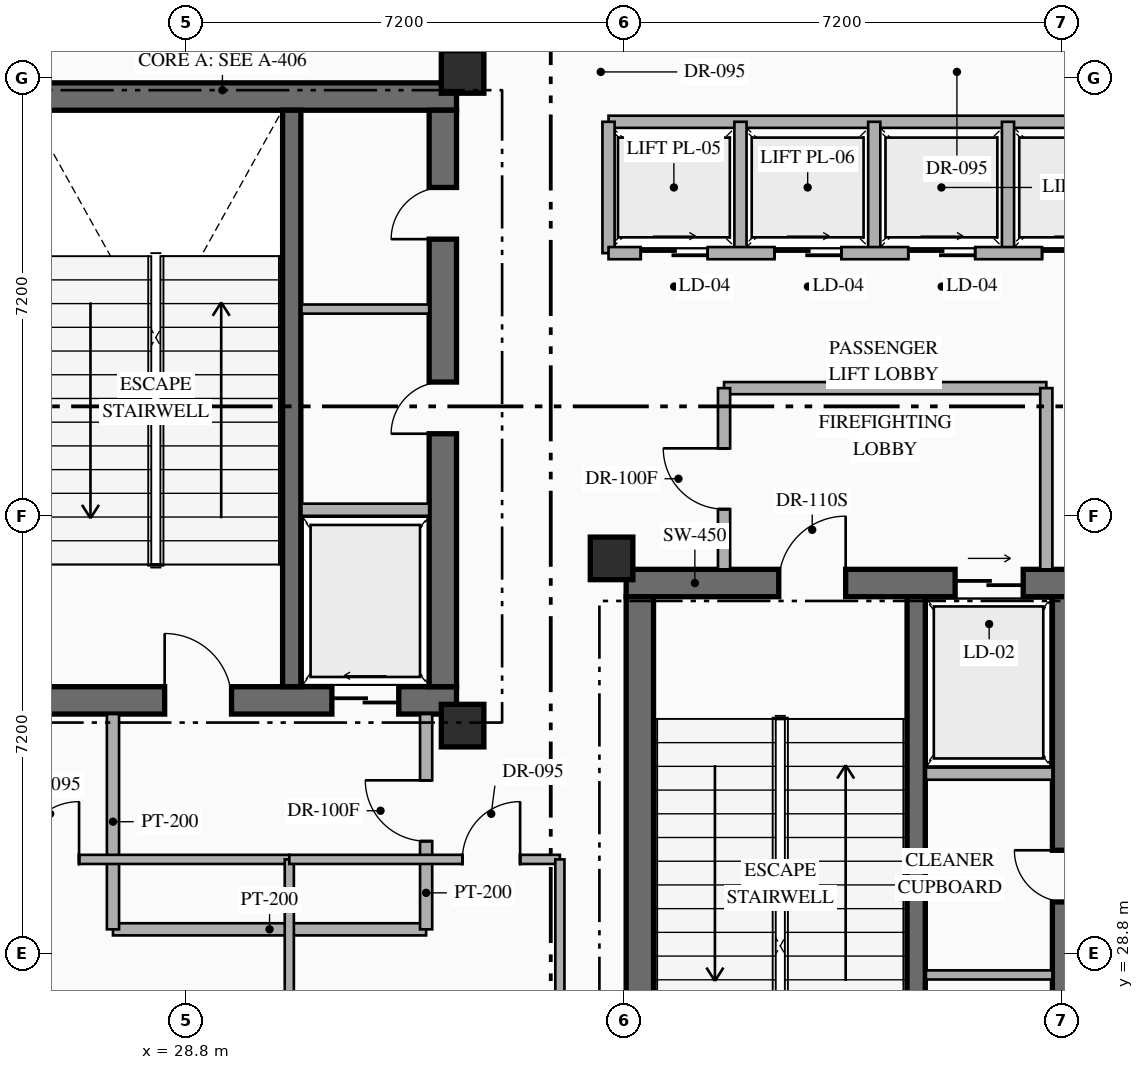
"""IFC4 building model, lengths in metres.
Left out: names, types, materials, properties, quantities, classifications, styles, units other than length and angle.
Written with IfcOpenShell. Run it as: python <this file> out.ifc"""

import sys

from ifc_helpers import new_model, si_unit, direction, frame, frame_2d, origin, origin_2d, place, context, subcontext, project, spatial, rectangle, hollow_rectangle, extrude, element, fill, save


model = new_model("IFC4")
c1 = context("Model", 3, precision=1e-05, world=origin(), true_north=direction((0.0, 1.0)))
c2 = subcontext(c1, "Body", "Model", "MODEL_VIEW")
j1 = project(units=[si_unit("LENGTHUNIT", "METRE"), si_unit("PLANEANGLEUNIT", "RADIAN")], contexts=[c1])
p1 = place(None, origin())
s1 = spatial("IfcSite", under=j1, at=p1, CompositionType="ELEMENT")
p2 = place(p1, origin())
s2 = spatial("IfcBuilding", under=s1, at=p2, CompositionType="ELEMENT")
p3 = place(p2, frame((0.0, 0.0, 234.75)))
s3 = spatial("IfcBuildingStorey", under=s2, at=p3, CompositionType="ELEMENT", Elevation=234.75)
p4 = place(p3, frame((25.77, 32.965, 0.0), z_axis=(0.0, 0.0, 1.0), x_axis=(1.0, 0.0, 0.0)))
e1 = element("IfcWall", 1, at=p4, inside=s3, PredefinedType="SHEAR", context=c2, shape_type="SweptSolid", body=[
    extrude(rectangle(XDim=7.48, YDim=0.45, at=frame_2d((3.74, 0.0))), origin(), (0.0, 0.0, 1.0), 4.8),
])
p5 = place(p4, frame((2.68, 0.0, 0.0)))
e2 = element("IfcOpeningElement", 2, at=p5, cuts=e1, PredefinedType="OPENING", context=c2, shape_type="SweptSolid", body=[
    extrude(rectangle(XDim=1.1, YDim=2.2, at=frame_2d((0.55, 1.1))), frame((0.0, 0.235, 0.0), z_axis=(0.0, -1.0, 0.0), x_axis=(1.0, 0.0, 0.0)), (0.0, 0.0, 1.0), 0.47),
])
p6 = place(p4, frame((5.43, 0.0, 0.0)))
e3 = element("IfcOpeningElement", 3, at=p6, cuts=e1, PredefinedType="OPENING", context=c2, shape_type="SweptSolid", body=[
    extrude(rectangle(XDim=1.1, YDim=2.15, at=frame_2d((0.55, 1.075))), frame((0.0, 0.235, 0.0), z_axis=(0.0, -1.0, 0.0), x_axis=(1.0, 0.0, 0.0)), (0.0, 0.0, 1.0), 0.47),
])
p7 = place(p3, frame((25.77, 42.895, 0.0), z_axis=(0.0, 0.0, 1.0), x_axis=(1.0, 0.0, 0.0)))
e4 = element("IfcWall", 4, at=p7, inside=s3, PredefinedType="SHEAR", context=c2, shape_type="SweptSolid", body=[
    extrude(rectangle(XDim=7.48, YDim=0.45, at=frame_2d((3.74, 0.0))), origin(), (0.0, 0.0, 1.0), 4.8),
])
p8 = place(p3, frame((33.025, 33.19, 0.0), z_axis=(0.0, 0.0, 1.0), x_axis=(0.0, 1.0, 0.0)))
e5 = element("IfcWall", 5, at=p8, inside=s3, PredefinedType="SHEAR", context=c2, shape_type="SweptSolid", body=[
    extrude(rectangle(XDim=9.48, YDim=0.45, at=frame_2d((4.74, 0.0))), origin(), (0.0, 0.0, 1.0), 4.8),
])
p9 = place(p8, frame((4.16, 0.0, 0.0)))
e6 = element("IfcOpeningElement", 6, at=p9, cuts=e5, PredefinedType="OPENING", context=c2, shape_type="SweptSolid", body=[
    extrude(rectangle(XDim=0.85, YDim=2.08, at=frame_2d((0.425, 1.04))), frame((0.0, 0.235, 0.0), z_axis=(0.0, -1.0, 0.0), x_axis=(1.0, 0.0, 0.0)), (0.0, 0.0, 1.0), 0.47),
])
p10 = place(p8, frame((7.36, 0.0, 0.0)))
e7 = element("IfcOpeningElement", 7, at=p10, cuts=e5, PredefinedType="OPENING", context=c2, shape_type="SweptSolid", body=[
    extrude(rectangle(XDim=0.85, YDim=2.08, at=frame_2d((0.425, 1.04))), frame((0.0, 0.235, 0.0), z_axis=(0.0, -1.0, 0.0), x_axis=(1.0, 0.0, 0.0)), (0.0, 0.0, 1.0), 0.47),
])
p11 = place(p3, frame((30.54, 33.19, 0.0), z_axis=(0.0, 0.0, 1.0), x_axis=(0.0, 1.0, 0.0)))
e8 = element("IfcWall", 8, at=p11, inside=s3, PredefinedType="SHEAR", context=c2, shape_type="SweptSolid", body=[
    extrude(rectangle(XDim=9.48, YDim=0.3, at=frame_2d((4.74, 0.0))), origin(), (0.0, 0.0, 1.0), 4.8),
])
p12 = place(p3, frame((36.04, 34.895, 0.0), z_axis=(0.0, 0.0, 1.0), x_axis=(1.0, 0.0, 0.0)))
e9 = element("IfcWall", 9, at=p12, inside=s3, PredefinedType="SHEAR", context=c2, shape_type="SweptSolid", body=[
    extrude(rectangle(XDim=7.46, YDim=0.45, at=frame_2d((3.73, 0.0))), origin(), (0.0, 0.0, 1.0), 4.8),
])
p13 = place(p12, frame((2.51, 0.0, 0.0)))
e10 = element("IfcOpeningElement", 10, at=p13, cuts=e9, PredefinedType="OPENING", context=c2, shape_type="SweptSolid", body=[
    extrude(rectangle(XDim=1.1, YDim=2.2, at=frame_2d((0.55, 1.1))), frame((0.0, 0.235, 0.0), z_axis=(0.0, -1.0, 0.0), x_axis=(1.0, 0.0, 0.0)), (0.0, 0.0, 1.0), 0.47),
])
p14 = place(p12, frame((5.41, 0.0, 0.0)))
e11 = element("IfcOpeningElement", 11, at=p14, cuts=e9, PredefinedType="OPENING", context=c2, shape_type="SweptSolid", body=[
    extrude(rectangle(XDim=1.12, YDim=2.15, at=frame_2d((0.56, 1.075))), frame((0.0, 0.235, 0.0), z_axis=(0.0, -1.0, 0.0), x_axis=(1.0, 0.0, 0.0)), (0.0, 0.0, 1.0), 0.47),
])
p15 = place(p3, frame((36.265, 25.19, 0.0), z_axis=(0.0, 0.0, 1.0), x_axis=(0.0, 1.0, 0.0)))
e12 = element("IfcWall", 12, at=p15, inside=s3, PredefinedType="SHEAR", context=c2, shape_type="SweptSolid", body=[
    extrude(rectangle(XDim=9.48, YDim=0.45, at=frame_2d((4.74, 0.0))), origin(), (0.0, 0.0, 1.0), 4.8),
])
p16 = place(p3, frame((43.275, 25.19, 0.0), z_axis=(0.0, 0.0, 1.0), x_axis=(0.0, 1.0, 0.0)))
e13 = element("IfcWall", 13, at=p16, inside=s3, PredefinedType="SHEAR", context=c2, shape_type="SweptSolid", body=[
    extrude(rectangle(XDim=9.48, YDim=0.45, at=frame_2d((4.74, 0.0))), origin(), (0.0, 0.0, 1.0), 4.8),
])
p17 = place(p16, frame((1.21, 0.0, 0.0)))
e14 = element("IfcOpeningElement", 14, at=p17, cuts=e13, PredefinedType="OPENING", context=c2, shape_type="SweptSolid", body=[
    extrude(rectangle(XDim=0.85, YDim=2.08, at=frame_2d((0.425, 1.04))), frame((0.0, 0.235, 0.0), z_axis=(0.0, -1.0, 0.0), x_axis=(1.0, 0.0, 0.0)), (0.0, 0.0, 1.0), 0.47),
])
p18 = place(p16, frame((4.46, 0.0, 0.0)))
e15 = element("IfcOpeningElement", 15, at=p18, cuts=e13, PredefinedType="OPENING", context=c2, shape_type="SweptSolid", body=[
    extrude(rectangle(XDim=0.85, YDim=2.08, at=frame_2d((0.425, 1.04))), frame((0.0, 0.235, 0.0), z_axis=(0.0, -1.0, 0.0), x_axis=(1.0, 0.0, 0.0)), (0.0, 0.0, 1.0), 0.47),
])
p19 = place(p3, frame((40.81, 25.19, 0.0), z_axis=(0.0, 0.0, 1.0), x_axis=(0.0, 1.0, 0.0)))
e16 = element("IfcWall", 16, at=p19, inside=s3, PredefinedType="SHEAR", context=c2, shape_type="SweptSolid", body=[
    extrude(rectangle(XDim=9.48, YDim=0.3, at=frame_2d((4.74, 0.0))), origin(), (0.0, 0.0, 1.0), 4.8),
])
for number, where, z_axis, x_axis in (
    (17, (33.35, 32.55, 0.0), (0.0, 0.0, 1.0), (1.0, 0.0, 0.0)),
    (18, (33.35, 43.3, 0.0), (0.0, 0.0, 1.0), (1.0, 0.0, 0.0)),
    (19, (35.8, 35.3, 0.0), (0.0, 0.0, 1.0), (1.0, 0.0, 0.0)),
):
    element("IfcColumn", number, at=place(p3, frame(where, z_axis=z_axis, x_axis=x_axis)), inside=s3, PredefinedType="COLUMN", context=c2, shape_type="SweptSolid", body=[
        extrude(hollow_rectangle(XDim=0.7, YDim=0.7, WallThickness=0.028, at=origin_2d()), origin(), (0.0, 0.0, 1.0), 4.8),
    ])
p20 = place(p3, frame((53.493, 31.358, 0.0), z_axis=(0.0, 0.0, 1.0), x_axis=(-0.599970072971, -0.800022444397, 0.0)))
e20 = element("IfcWall", 20, at=p20, inside=s3, PredefinedType="STANDARD", context=c2, shape_type="SweptSolid", body=[
    extrude(rectangle(XDim=20.885, YDim=0.28, at=frame_2d((10.442, 0.0))), origin(), (0.0, 0.0, 1.0), 4.55),
])
p21 = place(p20, frame((16.181, 0.0, 0.0)))
e21 = element("IfcOpeningElement", 21, at=p21, cuts=e20, PredefinedType="OPENING", context=c2, shape_type="SweptSolid", body=[
    extrude(rectangle(XDim=1.8, YDim=2.25, at=frame_2d((0.9, 1.125))), frame((0.0, 0.15, 0.0), z_axis=(0.0, -1.0, 0.0), x_axis=(1.0, 0.0, 0.0)), (0.0, 0.0, 1.0), 0.3),
])
p22 = place(p20, frame((1.456, 0.0, 0.75)))
e22 = element("IfcOpeningElement", 22, at=p22, cuts=e20, PredefinedType="OPENING", context=c2, shape_type="SweptSolid", body=[
    extrude(rectangle(XDim=2.1, YDim=2.2, at=frame_2d((1.05, 1.1))), frame((0.0, 0.15, 0.0), z_axis=(0.0, -1.0, 0.0), x_axis=(1.0, 0.0, 0.0)), (0.0, 0.0, 1.0), 0.3),
])
p23 = place(p3, frame((30.7, 36.1, 0.0), z_axis=(0.0, 0.0, 1.0), x_axis=(1.0, 0.0, 0.0)))
e23 = element("IfcWall", 23, at=p23, inside=s3, PredefinedType="STANDARD", context=c2, shape_type="SweptSolid", body=[
    extrude(rectangle(XDim=2.1, YDim=0.2, at=frame_2d((1.05, 0.0))), origin(), (0.0, 0.0, 1.0), 4.55),
])
p24 = place(p3, frame((30.7, 39.4, 0.0), z_axis=(0.0, 0.0, 1.0), x_axis=(1.0, 0.0, 0.0)))
e24 = element("IfcWall", 24, at=p24, inside=s3, PredefinedType="PARTITIONING", context=c2, shape_type="SweptSolid", body=[
    extrude(rectangle(XDim=2.1, YDim=0.15, at=frame_2d((1.05, 0.0))), origin(), (0.0, 0.0, 1.0), 4.55),
])
p25 = place(p3, frame((40.97, 31.76, 0.0), z_axis=(0.0, 0.0, 1.0), x_axis=(1.0, 0.0, 0.0)))
e25 = element("IfcWall", 25, at=p25, inside=s3, PredefinedType="STANDARD", context=c2, shape_type="SweptSolid", body=[
    extrude(rectangle(XDim=2.08, YDim=0.2, at=frame_2d((1.04, 0.0))), origin(), (0.0, 0.0, 1.0), 4.55),
])
p26 = place(p3, frame((40.97, 28.45, 0.0), z_axis=(0.0, 0.0, 1.0), x_axis=(1.0, 0.0, 0.0)))
e26 = element("IfcWall", 26, at=p26, inside=s3, PredefinedType="PARTITIONING", context=c2, shape_type="SweptSolid", body=[
    extrude(rectangle(XDim=2.08, YDim=0.15, at=frame_2d((1.04, 0.0))), origin(), (0.0, 0.0, 1.0), 4.55),
])
p27 = place(p3, frame((27.6, 29.2, 0.0), z_axis=(0.0, 0.0, 1.0), x_axis=(1.0, 0.0, 0.0)))
e27 = element("IfcWall", 27, at=p27, inside=s3, PredefinedType="STANDARD", context=c2, shape_type="SweptSolid", body=[
    extrude(rectangle(XDim=5.15, YDim=0.2, at=frame_2d((2.575, 0.0))), origin(), (0.0, 0.0, 1.0), 4.55),
])
p28 = place(p3, frame((27.6, 29.2, 0.0), z_axis=(0.0, 0.0, 1.0), x_axis=(0.0, 1.0, 0.0)))
e28 = element("IfcWall", 28, at=p28, inside=s3, PredefinedType="STANDARD", context=c2, shape_type="SweptSolid", body=[
    extrude(rectangle(XDim=3.54, YDim=0.2, at=frame_2d((1.77, 0.0))), origin(), (0.0, 0.0, 1.0), 4.55),
])
p29 = place(p3, frame((32.75, 29.2, 0.0), z_axis=(0.0, 0.0, 1.0), x_axis=(0.0, 1.0, 0.0)))
e29 = element("IfcWall", 29, at=p29, inside=s3, PredefinedType="STANDARD", context=c2, shape_type="SweptSolid", body=[
    extrude(rectangle(XDim=3.54, YDim=0.2, at=frame_2d((1.77, 0.0))), origin(), (0.0, 0.0, 1.0), 4.55),
])
p30 = place(p29, frame((1.45, 0.0, 0.0)))
e30 = element("IfcOpeningElement", 30, at=p30, cuts=e29, PredefinedType="OPENING", context=c2, shape_type="SweptSolid", body=[
    extrude(rectangle(XDim=1.0, YDim=2.2, at=frame_2d((0.5, 1.1))), frame((0.0, 0.11, 0.0), z_axis=(0.0, -1.0, 0.0), x_axis=(1.0, 0.0, 0.0)), (0.0, 0.0, 1.0), 0.22),
])
p31 = place(p3, frame((37.65, 38.1, 0.0), z_axis=(0.0, 0.0, 1.0), x_axis=(1.0, 0.0, 0.0)))
e31 = element("IfcWall", 31, at=p31, inside=s3, PredefinedType="STANDARD", context=c2, shape_type="SweptSolid", body=[
    extrude(rectangle(XDim=5.3, YDim=0.2, at=frame_2d((2.65, 0.0))), origin(), (0.0, 0.0, 1.0), 4.55),
])
p32 = place(p3, frame((42.95, 35.12, 0.0), z_axis=(0.0, 0.0, 1.0), x_axis=(0.0, 1.0, 0.0)))
e32 = element("IfcWall", 32, at=p32, inside=s3, PredefinedType="STANDARD", context=c2, shape_type="SweptSolid", body=[
    extrude(rectangle(XDim=2.98, YDim=0.2, at=frame_2d((1.49, 0.0))), origin(), (0.0, 0.0, 1.0), 4.55),
])
p33 = place(p3, frame((37.65, 35.12, 0.0), z_axis=(0.0, 0.0, 1.0), x_axis=(0.0, 1.0, 0.0)))
e33 = element("IfcWall", 33, at=p33, inside=s3, PredefinedType="STANDARD", context=c2, shape_type="SweptSolid", body=[
    extrude(rectangle(XDim=2.98, YDim=0.2, at=frame_2d((1.49, 0.0))), origin(), (0.0, 0.0, 1.0), 4.55),
])
p34 = place(p33, frame((0.99, 0.0, 0.0)))
e34 = element("IfcOpeningElement", 34, at=p34, cuts=e33, PredefinedType="OPENING", context=c2, shape_type="SweptSolid", body=[
    extrude(rectangle(XDim=1.0, YDim=2.2, at=frame_2d((0.5, 1.1))), frame((0.0, 0.11, 0.0), z_axis=(0.0, -1.0, 0.0), x_axis=(1.0, 0.0, 0.0)), (0.0, 0.0, 1.0), 0.22),
])
p35 = place(p3, frame((35.75, 42.48, 0.0), z_axis=(0.0, 0.0, 1.0), x_axis=(1.0, 0.0, 0.0)))
e35 = element("IfcWall", 35, at=p35, inside=s3, PredefinedType="STANDARD", context=c2, shape_type="SweptSolid", body=[
    extrude(rectangle(XDim=9.11, YDim=0.2, at=frame_2d((4.555, 0.0))), origin(), (0.0, 0.0, 1.0), 4.55),
])
for number, where, z_axis, x_axis in (
    (36, (35.75, 40.32, 0.0), (0.0, 0.0, 1.0), (0.0, 1.0, 0.0)),
    (37, (37.92, 40.32, 0.0), (0.0, 0.0, 1.0), (0.0, 1.0, 0.0)),
    (38, (40.12, 40.32, 0.0), (0.0, 0.0, 1.0), (0.0, 1.0, 0.0)),
    (39, (42.32, 40.32, 0.0), (0.0, 0.0, 1.0), (0.0, 1.0, 0.0)),
):
    element("IfcWall", number, at=place(p3, frame(where, z_axis=z_axis, x_axis=x_axis)), inside=s3, PredefinedType="STANDARD", context=c2, shape_type="SweptSolid", body=[
        extrude(rectangle(XDim=2.16, YDim=0.2, at=frame_2d((1.08, 0.0))), origin(), (0.0, 0.0, 1.0), 4.55),
    ])
p36 = place(p3, frame((35.75, 40.32, 0.0), z_axis=(0.0, 0.0, 1.0), x_axis=(1.0, 0.0, 0.0)))
e40 = element("IfcWall", 40, at=p36, inside=s3, PredefinedType="STANDARD", context=c2, shape_type="SweptSolid", body=[
    extrude(rectangle(XDim=9.11, YDim=0.2, at=frame_2d((4.555, 0.0))), origin(), (0.0, 0.0, 1.0), 4.55),
])
p37 = place(p36, frame((0.53, 0.0, 0.0)))
e41 = element("IfcOpeningElement", 41, at=p37, cuts=e40, PredefinedType="OPENING", context=c2, shape_type="SweptSolid", body=[
    extrude(rectangle(XDim=1.1, YDim=2.18, at=frame_2d((0.55, 1.09))), frame((0.0, 0.11, 0.0), z_axis=(0.0, -1.0, 0.0), x_axis=(1.0, 0.0, 0.0)), (0.0, 0.0, 1.0), 0.22),
])
p38 = place(p36, frame((2.73, 0.0, 0.0)))
e42 = element("IfcOpeningElement", 42, at=p38, cuts=e40, PredefinedType="OPENING", context=c2, shape_type="SweptSolid", body=[
    extrude(rectangle(XDim=1.1, YDim=2.18, at=frame_2d((0.55, 1.09))), frame((0.0, 0.11, 0.0), z_axis=(0.0, -1.0, 0.0), x_axis=(1.0, 0.0, 0.0)), (0.0, 0.0, 1.0), 0.22),
])
p39 = place(p36, frame((4.93, 0.0, 0.0)))
e43 = element("IfcOpeningElement", 43, at=p39, cuts=e40, PredefinedType="OPENING", context=c2, shape_type="SweptSolid", body=[
    extrude(rectangle(XDim=1.1, YDim=2.18, at=frame_2d((0.55, 1.09))), frame((0.0, 0.11, 0.0), z_axis=(0.0, -1.0, 0.0), x_axis=(1.0, 0.0, 0.0)), (0.0, 0.0, 1.0), 0.22),
])
p40 = place(p36, frame((7.13, 0.0, 0.0)))
e44 = element("IfcOpeningElement", 44, at=p40, cuts=e40, PredefinedType="OPENING", context=c2, shape_type="SweptSolid", body=[
    extrude(rectangle(XDim=1.1, YDim=2.18, at=frame_2d((0.55, 1.09))), frame((0.0, 0.11, 0.0), z_axis=(0.0, -1.0, 0.0), x_axis=(1.0, 0.0, 0.0)), (0.0, 0.0, 1.0), 0.22),
])
p41 = place(p3, frame((25.55, 30.35, 0.0), z_axis=(0.0, 0.0, 1.0), x_axis=(1.0, 0.0, 0.0)))
e45 = element("IfcWall", 45, at=p41, inside=s3, PredefinedType="PARTITIONING", context=c2, shape_type="SweptSolid", body=[
    extrude(rectangle(XDim=4.95, YDim=0.15, at=frame_2d((2.475, 0.0))), origin(), (0.0, 0.0, 1.0), 4.55),
])
p42 = place(p41, frame((0.542, 0.0, 0.0)))
e46 = element("IfcOpeningElement", 46, at=p42, cuts=e45, PredefinedType="OPENING", context=c2, shape_type="SweptSolid", body=[
    extrude(rectangle(XDim=0.95, YDim=2.15, at=frame_2d((0.475, 1.075))), frame((0.0, 0.085, 0.0), z_axis=(0.0, -1.0, 0.0), x_axis=(1.0, 0.0, 0.0)), (0.0, 0.0, 1.0), 0.17),
])
p43 = place(p3, frame((30.5, 23.2, 0.0), z_axis=(0.0, 0.0, 1.0), x_axis=(0.0, 1.0, 0.0)))
e47 = element("IfcWall", 47, at=p43, inside=s3, PredefinedType="PARTITIONING", context=c2, shape_type="SweptSolid", body=[
    extrude(rectangle(XDim=7.15, YDim=0.15, at=frame_2d((3.575, 0.0))), origin(), (0.0, 0.0, 1.0), 4.55),
])
p44 = place(p3, frame((30.5, 30.35, 0.0), z_axis=(0.0, 0.0, 1.0), x_axis=(1.0, 0.0, 0.0)))
e48 = element("IfcWall", 48, at=p44, inside=s3, PredefinedType="PARTITIONING", context=c2, shape_type="SweptSolid", body=[
    extrude(rectangle(XDim=4.45, YDim=0.15, at=frame_2d((2.225, 0.0))), origin(), (0.0, 0.0, 1.0), 4.55),
])
p45 = place(p44, frame((2.846, 0.0, 0.0)))
e49 = element("IfcOpeningElement", 49, at=p45, cuts=e48, PredefinedType="OPENING", context=c2, shape_type="SweptSolid", body=[
    extrude(rectangle(XDim=0.95, YDim=2.15, at=frame_2d((0.475, 1.075))), frame((0.0, 0.085, 0.0), z_axis=(0.0, -1.0, 0.0), x_axis=(1.0, 0.0, 0.0)), (0.0, 0.0, 1.0), 0.17),
])
p46 = place(p3, frame((34.95, 23.2, 0.0), z_axis=(0.0, 0.0, 1.0), x_axis=(0.0, 1.0, 0.0)))
e50 = element("IfcWall", 50, at=p46, inside=s3, PredefinedType="PARTITIONING", context=c2, shape_type="SweptSolid", body=[
    extrude(rectangle(XDim=7.15, YDim=0.15, at=frame_2d((3.575, 0.0))), origin(), (0.0, 0.0, 1.0), 4.55),
])
p47 = place(p5, origin())
e51 = element("IfcDoor", 51, at=p47, inside=s3, OperationType="SINGLE_SWING_LEFT", PredefinedType="DOOR", context=c2, shape_type="SweptSolid", body=[
    extrude(rectangle(XDim=1.1, YDim=2.2, at=frame_2d((0.55, 1.1))), frame((0.0, 0.025, 0.0), z_axis=(0.0, -1.0, 0.0), x_axis=(1.0, 0.0, 0.0)), (0.0, 0.0, 1.0), 0.05),
])
fill(e2, e51)
p48 = place(p6, origin())
e52 = element("IfcDoor", 52, at=p48, inside=s3, OperationType="SLIDING_TO_LEFT", PredefinedType="USERDEFINED", context=c2, shape_type="SweptSolid", body=[
    extrude(rectangle(XDim=1.1, YDim=2.15, at=frame_2d((0.55, 1.075))), frame((0.0, 0.025, 0.0), z_axis=(0.0, -1.0, 0.0), x_axis=(1.0, 0.0, 0.0)), (0.0, 0.0, 1.0), 0.05),
])
fill(e3, e52)
p49 = place(p13, origin())
e53 = element("IfcDoor", 53, at=p49, inside=s3, OperationType="SINGLE_SWING_RIGHT", PredefinedType="DOOR", context=c2, shape_type="SweptSolid", body=[
    extrude(rectangle(XDim=1.1, YDim=2.2, at=frame_2d((0.55, 1.1))), frame((0.0, 0.025, 0.0), z_axis=(0.0, -1.0, 0.0), x_axis=(1.0, 0.0, 0.0)), (0.0, 0.0, 1.0), 0.05),
])
fill(e10, e53)
p50 = place(p14, origin())
e54 = element("IfcDoor", 54, at=p50, inside=s3, OperationType="SLIDING_TO_RIGHT", PredefinedType="USERDEFINED", context=c2, shape_type="SweptSolid", body=[
    extrude(rectangle(XDim=1.12, YDim=2.15, at=frame_2d((0.56, 1.075))), frame((0.0, 0.025, 0.0), z_axis=(0.0, -1.0, 0.0), x_axis=(1.0, 0.0, 0.0)), (0.0, 0.0, 1.0), 0.05),
])
fill(e11, e54)
p51 = place(p9, origin())
e55 = element("IfcDoor", 55, at=p51, inside=s3, OperationType="SINGLE_SWING_LEFT", PredefinedType="DOOR", context=c2, shape_type="SweptSolid", body=[
    extrude(rectangle(XDim=0.85, YDim=2.08, at=frame_2d((0.425, 1.04))), frame((0.0, 0.025, 0.0), z_axis=(0.0, -1.0, 0.0), x_axis=(1.0, 0.0, 0.0)), (0.0, 0.0, 1.0), 0.05),
])
fill(e6, e55)
p52 = place(p10, origin())
e56 = element("IfcDoor", 56, at=p52, inside=s3, OperationType="SINGLE_SWING_LEFT", PredefinedType="DOOR", context=c2, shape_type="SweptSolid", body=[
    extrude(rectangle(XDim=0.85, YDim=2.08, at=frame_2d((0.425, 1.04))), frame((0.0, 0.025, 0.0), z_axis=(0.0, -1.0, 0.0), x_axis=(1.0, 0.0, 0.0)), (0.0, 0.0, 1.0), 0.05),
])
fill(e7, e56)
p53 = place(p30, origin())
e57 = element("IfcDoor", 57, at=p53, inside=s3, OperationType="SINGLE_SWING_RIGHT", PredefinedType="DOOR", context=c2, shape_type="SweptSolid", body=[
    extrude(rectangle(XDim=1.0, YDim=2.2, at=frame_2d((0.5, 1.1))), frame((0.0, 0.025, 0.0), z_axis=(0.0, -1.0, 0.0), x_axis=(1.0, 0.0, 0.0)), (0.0, 0.0, 1.0), 0.05),
])
fill(e30, e57)
p54 = place(p34, origin())
e58 = element("IfcDoor", 58, at=p54, inside=s3, OperationType="SINGLE_SWING_RIGHT", PredefinedType="DOOR", context=c2, shape_type="SweptSolid", body=[
    extrude(rectangle(XDim=1.0, YDim=2.2, at=frame_2d((0.5, 1.1))), frame((0.0, 0.025, 0.0), z_axis=(0.0, -1.0, 0.0), x_axis=(1.0, 0.0, 0.0)), (0.0, 0.0, 1.0), 0.05),
])
fill(e34, e58)
p55 = place(p37, origin())
e59 = element("IfcDoor", 59, at=p55, inside=s3, OperationType="SLIDING_TO_RIGHT", PredefinedType="USERDEFINED", context=c2, shape_type="SweptSolid", body=[
    extrude(rectangle(XDim=1.1, YDim=2.18, at=frame_2d((0.55, 1.09))), frame((0.0, 0.025, 0.0), z_axis=(0.0, -1.0, 0.0), x_axis=(1.0, 0.0, 0.0)), (0.0, 0.0, 1.0), 0.05),
])
fill(e41, e59)
p56 = place(p38, origin())
e60 = element("IfcDoor", 60, at=p56, inside=s3, OperationType="SLIDING_TO_RIGHT", PredefinedType="USERDEFINED", context=c2, shape_type="SweptSolid", body=[
    extrude(rectangle(XDim=1.1, YDim=2.18, at=frame_2d((0.55, 1.09))), frame((0.0, 0.025, 0.0), z_axis=(0.0, -1.0, 0.0), x_axis=(1.0, 0.0, 0.0)), (0.0, 0.0, 1.0), 0.05),
])
fill(e42, e60)
p57 = place(p39, origin())
e61 = element("IfcDoor", 61, at=p57, inside=s3, OperationType="SLIDING_TO_RIGHT", PredefinedType="USERDEFINED", context=c2, shape_type="SweptSolid", body=[
    extrude(rectangle(XDim=1.1, YDim=2.18, at=frame_2d((0.55, 1.09))), frame((0.0, 0.025, 0.0), z_axis=(0.0, -1.0, 0.0), x_axis=(1.0, 0.0, 0.0)), (0.0, 0.0, 1.0), 0.05),
])
fill(e43, e61)
p58 = place(p40, origin())
e62 = element("IfcDoor", 62, at=p58, inside=s3, OperationType="SLIDING_TO_RIGHT", PredefinedType="USERDEFINED", context=c2, shape_type="SweptSolid", body=[
    extrude(rectangle(XDim=1.1, YDim=2.18, at=frame_2d((0.55, 1.09))), frame((0.0, 0.025, 0.0), z_axis=(0.0, -1.0, 0.0), x_axis=(1.0, 0.0, 0.0)), (0.0, 0.0, 1.0), 0.05),
])
fill(e44, e62)
p59 = place(p42, origin())
e63 = element("IfcDoor", 63, at=p59, inside=s3, OperationType="SINGLE_SWING_RIGHT", PredefinedType="DOOR", context=c2, shape_type="SweptSolid", body=[
    extrude(rectangle(XDim=0.95, YDim=2.15, at=frame_2d((0.475, 1.075))), frame((0.0, 0.025, 0.0), z_axis=(0.0, -1.0, 0.0), x_axis=(1.0, 0.0, 0.0)), (0.0, 0.0, 1.0), 0.05),
])
fill(e46, e63)
p60 = place(p45, origin())
e64 = element("IfcDoor", 64, at=p60, inside=s3, OperationType="SINGLE_SWING_RIGHT", PredefinedType="DOOR", context=c2, shape_type="SweptSolid", body=[
    extrude(rectangle(XDim=0.95, YDim=2.15, at=frame_2d((0.475, 1.075))), frame((0.0, 0.025, 0.0), z_axis=(0.0, -1.0, 0.0), x_axis=(1.0, 0.0, 0.0)), (0.0, 0.0, 1.0), 0.05),
])
fill(e49, e64)
save(model, sys.argv[1])
